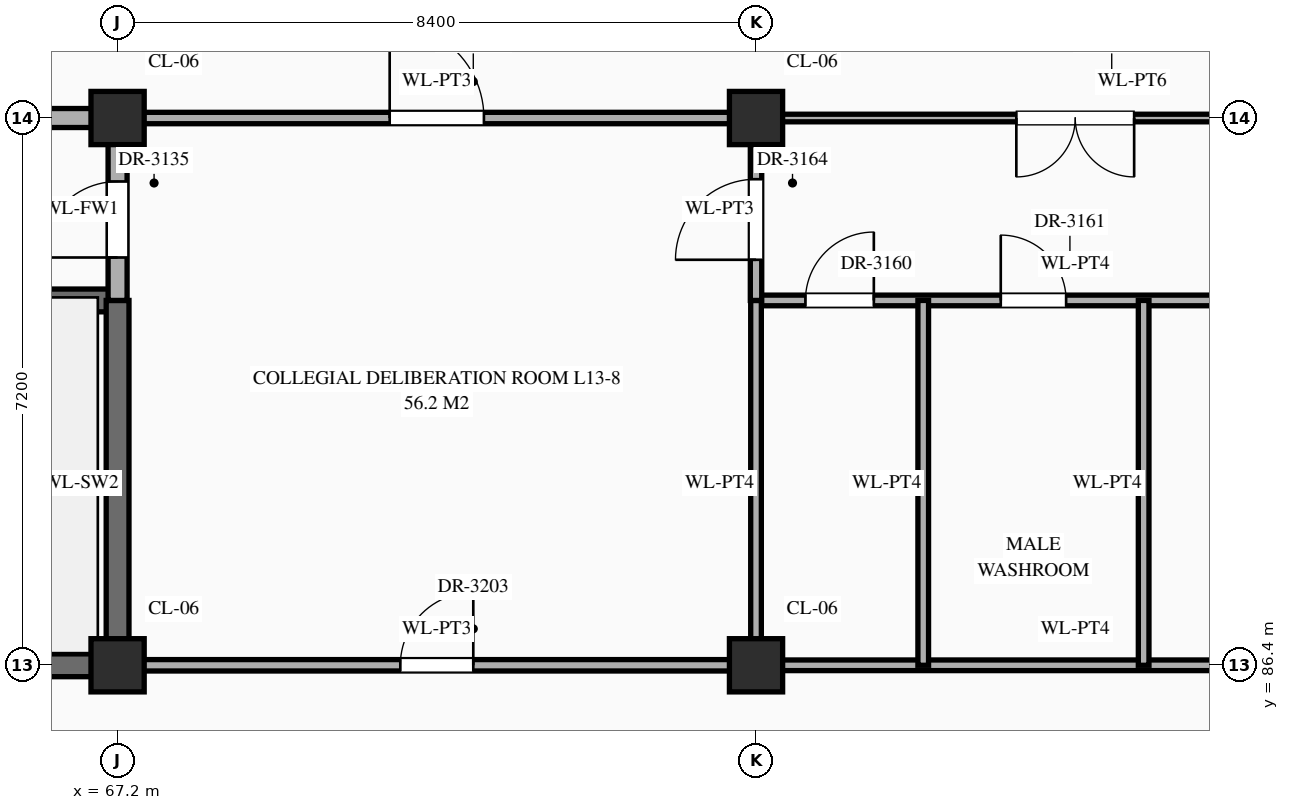
"""IFC4 building model, lengths in metres.
Left out: names, types, materials, properties, quantities, classifications, styles, units other than length and angle.
Written with IfcOpenShell. Run it as: python <this file> out.ifc"""

import sys

from ifc_helpers import new_model, si_unit, direction, frame, frame_2d, origin, origin_2d, place, context, subcontext, project, spatial, rectangle, extrude, element, fill, save


model = new_model("IFC4")
c1 = context("Model", 3, precision=1e-05, world=origin(), true_north=direction((0.0, 1.0)))
c2 = subcontext(c1, "Body", "Model", "MODEL_VIEW")
j1 = project(units=[si_unit("LENGTHUNIT", "METRE"), si_unit("PLANEANGLEUNIT", "RADIAN")], contexts=[c1])
p1 = place(None, origin())
s1 = spatial("IfcSite", under=j1, at=p1, CompositionType="ELEMENT")
p2 = place(p1, origin())
s2 = spatial("IfcBuilding", under=s1, at=p2, CompositionType="ELEMENT")
p3 = place(p2, frame((0.0, 0.0, 56.1)))
s3 = spatial("IfcBuildingStorey", under=s2, at=p3, CompositionType="ELEMENT", Elevation=56.1)
for number, where, z_axis, x_axis in (
    (1, (67.2, 86.4, 0.0), (0.0, 0.0, 1.0), (1.0, 0.0, 0.0)),
    (2, (67.2, 93.6, 0.0), (0.0, 0.0, 1.0), (1.0, 0.0, 0.0)),
    (3, (75.6, 86.4, 0.0), (0.0, 0.0, 1.0), (1.0, 0.0, 0.0)),
    (4, (75.6, 93.6, 0.0), (0.0, 0.0, 1.0), (1.0, 0.0, 0.0)),
):
    element("IfcColumn", number, at=place(p3, frame(where, z_axis=z_axis, x_axis=x_axis)), inside=s3, PredefinedType="COLUMN", context=c2, shape_type="SweptSolid", body=[
        extrude(rectangle(XDim=0.7, YDim=0.7, at=origin_2d()), origin(), (0.0, 0.0, 1.0), 4.2),
    ])
p4 = place(p3, frame((58.8, 86.4, 0.0), z_axis=(0.0, 0.0, 1.0), x_axis=(1.0, 0.0, 0.0)))
e5 = element("IfcWall", 5, at=p4, inside=s3, PredefinedType="SHEAR", context=c2, shape_type="SweptSolid", body=[
    extrude(rectangle(XDim=8.4, YDim=0.3, at=frame_2d((4.2, 0.0))), origin(), (0.0, 0.0, 1.0), 3.96),
])
p5 = place(p3, frame((67.2, 86.4, 0.0), z_axis=(0.0, 0.0, 1.0), x_axis=(1.0, 0.0, 0.0)))
e6 = element("IfcWall", 6, at=p5, inside=s3, PredefinedType="STANDARD", context=c2, shape_type="SweptSolid", body=[
    extrude(rectangle(XDim=8.4, YDim=0.15, at=frame_2d((4.2, 0.0))), origin(), (0.0, 0.0, 1.0), 3.11),
])
p6 = place(p5, frame((3.72, 0.0, 0.0)))
e7 = element("IfcOpeningElement", 7, at=p6, cuts=e6, PredefinedType="OPENING", context=c2, shape_type="SweptSolid", body=[
    extrude(rectangle(XDim=0.96, YDim=2.2, at=frame_2d((0.48, 1.1))), frame((0.0, 0.087, 0.0), z_axis=(0.0, -1.0, 0.0), x_axis=(1.0, 0.0, 0.0)), (0.0, 0.0, 1.0), 0.174),
])
p7 = place(p3, frame((75.6, 86.4, 0.0), z_axis=(0.0, 0.0, 1.0), x_axis=(1.0, 0.0, 0.0)))
e8 = element("IfcWall", 8, at=p7, inside=s3, PredefinedType="STANDARD", context=c2, shape_type="SweptSolid", body=[
    extrude(rectangle(XDim=8.4, YDim=0.14, at=frame_2d((4.2, 0.0))), origin(), (0.0, 0.0, 1.0), 3.11),
])
p8 = place(p3, frame((58.8, 91.2, 0.0), z_axis=(0.0, 0.0, 1.0), x_axis=(1.0, 0.0, 0.0)))
e9 = element("IfcWall", 9, at=p8, inside=s3, PredefinedType="SHEAR", context=c2, shape_type="SweptSolid", body=[
    extrude(rectangle(XDim=8.4, YDim=0.3, at=frame_2d((4.2, 0.0))), origin(), (0.0, 0.0, 1.0), 3.96),
])
p9 = place(p8, frame((0.65, 0.0, 0.0)))
e10 = element("IfcOpeningElement", 10, at=p9, cuts=e9, PredefinedType="OPENING", context=c2, shape_type="SweptSolid", body=[
    extrude(rectangle(XDim=1.1, YDim=2.2, at=frame_2d((0.55, 1.1))), frame((0.0, 0.162, 0.0), z_axis=(0.0, -1.0, 0.0), x_axis=(1.0, 0.0, 0.0)), (0.0, 0.0, 1.0), 0.324),
])
p10 = place(p3, frame((75.6, 91.2, 0.0), z_axis=(0.0, 0.0, 1.0), x_axis=(1.0, 0.0, 0.0)))
e11 = element("IfcWall", 11, at=p10, inside=s3, PredefinedType="STANDARD", context=c2, shape_type="SweptSolid", body=[
    extrude(rectangle(XDim=8.4, YDim=0.14, at=frame_2d((4.2, 0.0))), origin(), (0.0, 0.0, 1.0), 3.96),
])
p11 = place(p10, frame((0.65, 0.0, 0.0)))
e12 = element("IfcOpeningElement", 12, at=p11, cuts=e11, PredefinedType="OPENING", context=c2, shape_type="SweptSolid", body=[
    extrude(rectangle(XDim=0.9, YDim=2.15, at=frame_2d((0.45, 1.075))), frame((0.0, 0.082, 0.0), z_axis=(0.0, -1.0, 0.0), x_axis=(1.0, 0.0, 0.0)), (0.0, 0.0, 1.0), 0.164),
])
p12 = place(p10, frame((3.22, 0.0, 0.0)))
e13 = element("IfcOpeningElement", 13, at=p12, cuts=e11, PredefinedType="OPENING", context=c2, shape_type="SweptSolid", body=[
    extrude(rectangle(XDim=0.86, YDim=2.1, at=frame_2d((0.43, 1.05))), frame((0.0, 0.082, 0.0), z_axis=(0.0, -1.0, 0.0), x_axis=(1.0, 0.0, 0.0)), (0.0, 0.0, 1.0), 0.164),
])
p13 = place(p10, frame((6.32, 0.0, 0.0)))
e14 = element("IfcOpeningElement", 14, at=p13, cuts=e11, PredefinedType="OPENING", context=c2, shape_type="SweptSolid", body=[
    extrude(rectangle(XDim=0.86, YDim=2.1, at=frame_2d((0.43, 1.05))), frame((0.0, 0.082, 0.0), z_axis=(0.0, -1.0, 0.0), x_axis=(1.0, 0.0, 0.0)), (0.0, 0.0, 1.0), 0.164),
])
p14 = place(p3, frame((58.8, 93.6, 0.0), z_axis=(0.0, 0.0, 1.0), x_axis=(1.0, 0.0, 0.0)))
e15 = element("IfcWall", 15, at=p14, inside=s3, PredefinedType="STANDARD", context=c2, shape_type="SweptSolid", body=[
    extrude(rectangle(XDim=8.4, YDim=0.25, at=frame_2d((4.2, 0.0))), origin(), (0.0, 0.0, 1.0), 3.11),
])
p15 = place(p14, frame((3.45, 0.0, 0.0)))
e16 = element("IfcOpeningElement", 16, at=p15, cuts=e15, PredefinedType="OPENING", context=c2, shape_type="SweptSolid", body=[
    extrude(rectangle(XDim=1.5, YDim=2.25, at=frame_2d((0.75, 1.125))), frame((0.0, 0.137, 0.0), z_axis=(0.0, -1.0, 0.0), x_axis=(1.0, 0.0, 0.0)), (0.0, 0.0, 1.0), 0.274),
])
p16 = place(p3, frame((67.2, 93.6, 0.0), z_axis=(0.0, 0.0, 1.0), x_axis=(1.0, 0.0, 0.0)))
e17 = element("IfcWall", 17, at=p16, inside=s3, PredefinedType="STANDARD", context=c2, shape_type="SweptSolid", body=[
    extrude(rectangle(XDim=8.4, YDim=0.15, at=frame_2d((4.2, 0.0))), origin(), (0.0, 0.0, 1.0), 3.11),
])
p17 = place(p16, frame((3.58, 0.0, 0.0)))
e18 = element("IfcOpeningElement", 18, at=p17, cuts=e17, PredefinedType="OPENING", context=c2, shape_type="SweptSolid", body=[
    extrude(rectangle(XDim=1.24, YDim=2.3, at=frame_2d((0.62, 1.15))), frame((0.0, 0.087, 0.0), z_axis=(0.0, -1.0, 0.0), x_axis=(1.0, 0.0, 0.0)), (0.0, 0.0, 1.0), 0.174),
])
p18 = place(p3, frame((75.6, 93.6, 0.0), z_axis=(0.0, 0.0, 1.0), x_axis=(1.0, 0.0, 0.0)))
e19 = element("IfcWall", 19, at=p18, inside=s3, PredefinedType="STANDARD", context=c2, shape_type="SweptSolid", body=[
    extrude(rectangle(XDim=14.0, YDim=0.1, at=frame_2d((7.0, 0.0))), origin(), (0.0, 0.0, 1.0), 3.11),
])
p19 = place(p18, frame((3.425, 0.0, 0.0)))
e20 = element("IfcOpeningElement", 20, at=p19, cuts=e19, PredefinedType="OPENING", context=c2, shape_type="SweptSolid", body=[
    extrude(rectangle(XDim=1.55, YDim=2.35, at=frame_2d((0.775, 1.175))), frame((0.0, 0.062, 0.0), z_axis=(0.0, -1.0, 0.0), x_axis=(1.0, 0.0, 0.0)), (0.0, 0.0, 1.0), 0.124),
])
p20 = place(p18, frame((9.475, 0.0, 0.0)))
e21 = element("IfcOpeningElement", 21, at=p20, cuts=e19, PredefinedType="OPENING", context=c2, shape_type="SweptSolid", body=[
    extrude(rectangle(XDim=0.92, YDim=2.15, at=frame_2d((0.46, 1.075))), frame((0.0, 0.062, 0.0), z_axis=(0.0, -1.0, 0.0), x_axis=(1.0, 0.0, 0.0)), (0.0, 0.0, 1.0), 0.124),
])
p21 = place(p18, frame((12.12, 0.0, 0.0)))
e22 = element("IfcOpeningElement", 22, at=p21, cuts=e19, PredefinedType="OPENING", context=c2, shape_type="SweptSolid", body=[
    extrude(rectangle(XDim=0.96, YDim=2.2, at=frame_2d((0.48, 1.1))), frame((0.0, 0.062, 0.0), z_axis=(0.0, -1.0, 0.0), x_axis=(1.0, 0.0, 0.0)), (0.0, 0.0, 1.0), 0.124),
])
p22 = place(p3, frame((67.2, 86.4, 0.0), z_axis=(0.0, 0.0, 1.0), x_axis=(0.0, 1.0, 0.0)))
e23 = element("IfcWall", 23, at=p22, inside=s3, PredefinedType="SHEAR", context=c2, shape_type="SweptSolid", body=[
    extrude(rectangle(XDim=4.8, YDim=0.3, at=frame_2d((2.4, 0.0))), origin(), (0.0, 0.0, 1.0), 3.96),
])
p23 = place(p3, frame((67.2, 91.2, 0.0), z_axis=(0.0, 0.0, 1.0), x_axis=(0.0, 1.0, 0.0)))
e24 = element("IfcWall", 24, at=p23, inside=s3, PredefinedType="STANDARD", context=c2, shape_type="SweptSolid", body=[
    extrude(rectangle(XDim=2.4, YDim=0.25, at=frame_2d((1.2, 0.0))), origin(), (0.0, 0.0, 1.0), 3.21),
])
p24 = place(p23, frame((0.565, 0.0, 0.0)))
e25 = element("IfcOpeningElement", 25, at=p24, cuts=e24, PredefinedType="OPENING", context=c2, shape_type="SweptSolid", body=[
    extrude(rectangle(XDim=1.0, YDim=2.2, at=frame_2d((0.5, 1.1))), frame((0.0, 0.137, 0.0), z_axis=(0.0, -1.0, 0.0), x_axis=(1.0, 0.0, 0.0)), (0.0, 0.0, 1.0), 0.274),
])
p25 = place(p3, frame((75.6, 86.4, 0.0), z_axis=(0.0, 0.0, 1.0), x_axis=(0.0, 1.0, 0.0)))
e26 = element("IfcWall", 26, at=p25, inside=s3, PredefinedType="STANDARD", context=c2, shape_type="SweptSolid", body=[
    extrude(rectangle(XDim=4.8, YDim=0.14, at=frame_2d((2.4, 0.0))), origin(), (0.0, 0.0, 1.0), 3.21),
])
p26 = place(p3, frame((75.6, 91.2, 0.0), z_axis=(0.0, 0.0, 1.0), x_axis=(0.0, 1.0, 0.0)))
e27 = element("IfcWall", 27, at=p26, inside=s3, PredefinedType="STANDARD", context=c2, shape_type="SweptSolid", body=[
    extrude(rectangle(XDim=2.4, YDim=0.15, at=frame_2d((1.2, 0.0))), origin(), (0.0, 0.0, 1.0), 3.21),
])
p27 = place(p26, frame((0.535, 0.0, 0.0)))
e28 = element("IfcOpeningElement", 28, at=p27, cuts=e27, PredefinedType="OPENING", context=c2, shape_type="SweptSolid", body=[
    extrude(rectangle(XDim=1.06, YDim=2.4, at=frame_2d((0.53, 1.2))), frame((0.0, 0.087, 0.0), z_axis=(0.0, -1.0, 0.0), x_axis=(1.0, 0.0, 0.0)), (0.0, 0.0, 1.0), 0.174),
])
for number, where, z_axis, x_axis in (
    (29, (77.8, 86.4, 0.0), (0.0, 0.0, 1.0), (0.0, 1.0, 0.0)),
    (30, (80.7, 86.4, 0.0), (0.0, 0.0, 1.0), (0.0, 1.0, 0.0)),
):
    element("IfcWall", number, at=place(p3, frame(where, z_axis=z_axis, x_axis=x_axis)), inside=s3, PredefinedType="STANDARD", context=c2, shape_type="SweptSolid", body=[
        extrude(rectangle(XDim=4.8, YDim=0.14, at=frame_2d((2.4, 0.0))), origin(), (0.0, 0.0, 1.0), 3.96),
    ])
p28 = place(p24, origin())
e31 = element("IfcDoor", 31, at=p28, inside=s3, OperationType="SINGLE_SWING_LEFT", PredefinedType="DOOR", context=c2, shape_type="SweptSolid", body=[
    extrude(rectangle(XDim=1.0, YDim=2.2, at=frame_2d((0.5, 1.1))), frame((0.0, 0.025, 0.0), z_axis=(0.0, -1.0, 0.0), x_axis=(1.0, 0.0, 0.0)), (0.0, 0.0, 1.0), 0.05),
])
fill(e25, e31)
p29 = place(p11, origin())
e32 = element("IfcDoor", 32, at=p29, inside=s3, OperationType="SINGLE_SWING_RIGHT", PredefinedType="DOOR", context=c2, shape_type="SweptSolid", body=[
    extrude(rectangle(XDim=0.9, YDim=2.15, at=frame_2d((0.45, 1.075))), frame((0.0, 0.025, 0.0), z_axis=(0.0, -1.0, 0.0), x_axis=(1.0, 0.0, 0.0)), (0.0, 0.0, 1.0), 0.05),
])
fill(e12, e32)
p30 = place(p12, origin())
e33 = element("IfcDoor", 33, at=p30, inside=s3, OperationType="SINGLE_SWING_LEFT", PredefinedType="DOOR", context=c2, shape_type="SweptSolid", body=[
    extrude(rectangle(XDim=0.86, YDim=2.1, at=frame_2d((0.43, 1.05))), frame((0.0, 0.025, 0.0), z_axis=(0.0, -1.0, 0.0), x_axis=(1.0, 0.0, 0.0)), (0.0, 0.0, 1.0), 0.05),
])
fill(e13, e33)
p31 = place(p19, frame((1.55, 0.0, 0.0), z_axis=(0.0, 0.0, 1.0), x_axis=(-1.0, 0.0, 0.0)))
e34 = element("IfcDoor", 34, at=p31, inside=s3, OperationType="DOUBLE_DOOR_SINGLE_SWING", PredefinedType="DOOR", context=c2, shape_type="SweptSolid", body=[
    extrude(rectangle(XDim=1.55, YDim=2.35, at=frame_2d((0.775, 1.175))), frame((0.0, 0.025, 0.0), z_axis=(0.0, -1.0, 0.0), x_axis=(1.0, 0.0, 0.0)), (0.0, 0.0, 1.0), 0.05),
])
fill(e20, e34)
p32 = place(p27, origin())
e35 = element("IfcDoor", 35, at=p32, inside=s3, OperationType="SINGLE_SWING_LEFT", PredefinedType="DOOR", context=c2, shape_type="SweptSolid", body=[
    extrude(rectangle(XDim=1.06, YDim=2.4, at=frame_2d((0.53, 1.2))), frame((0.0, 0.025, 0.0), z_axis=(0.0, -1.0, 0.0), x_axis=(1.0, 0.0, 0.0)), (0.0, 0.0, 1.0), 0.05),
])
fill(e28, e35)
p33 = place(p17, origin())
e36 = element("IfcDoor", 36, at=p33, inside=s3, OperationType="SINGLE_SWING_LEFT", PredefinedType="DOOR", context=c2, shape_type="SweptSolid", body=[
    extrude(rectangle(XDim=1.24, YDim=2.3, at=frame_2d((0.62, 1.15))), frame((0.0, 0.025, 0.0), z_axis=(0.0, -1.0, 0.0), x_axis=(1.0, 0.0, 0.0)), (0.0, 0.0, 1.0), 0.05),
])
fill(e18, e36)
p34 = place(p6, origin())
e37 = element("IfcDoor", 37, at=p34, inside=s3, OperationType="SINGLE_SWING_RIGHT", PredefinedType="DOOR", context=c2, shape_type="SweptSolid", body=[
    extrude(rectangle(XDim=0.96, YDim=2.2, at=frame_2d((0.48, 1.1))), frame((0.0, 0.025, 0.0), z_axis=(0.0, -1.0, 0.0), x_axis=(1.0, 0.0, 0.0)), (0.0, 0.0, 1.0), 0.05),
])
fill(e7, e37)
save(model, sys.argv[1])
